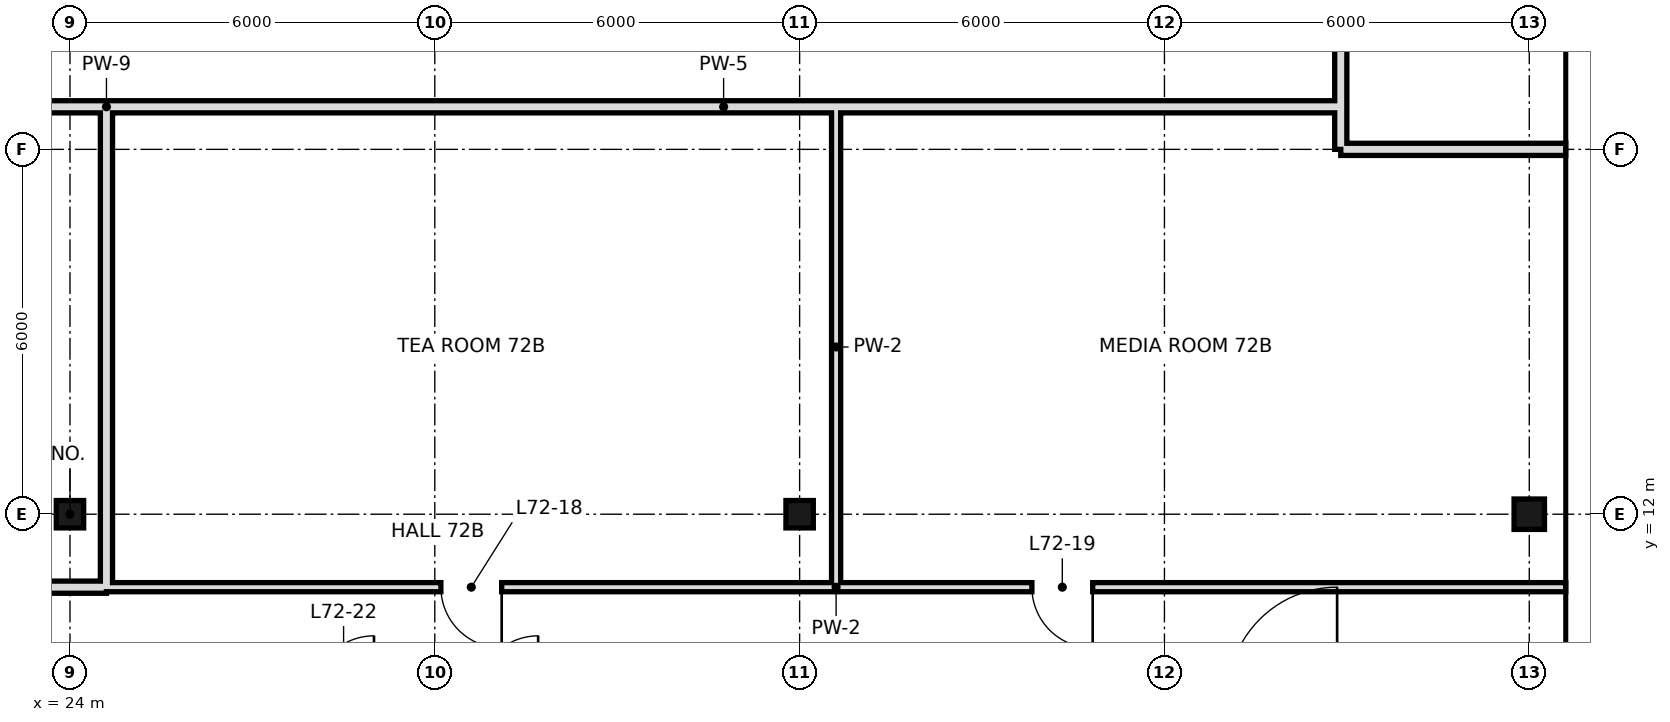
"""IFC4 building model, lengths in metres.
Left out: names, types, materials, properties, quantities, classifications, styles, units other than length and angle.
Written with IfcOpenShell. Run it as: python <this file> out.ifc"""

import sys

from ifc_helpers import new_model, si_unit, direction, frame, frame_2d, origin, origin_2d, place, context, subcontext, project, spatial, rectangle, hollow_rectangle, extrude, element, fill, save


model = new_model("IFC4")
c1 = context("Model", 3, precision=1e-05, world=origin(), true_north=direction((0.0, 1.0)))
c2 = subcontext(c1, "Body", "Model", "MODEL_VIEW")
j1 = project(units=[si_unit("LENGTHUNIT", "METRE"), si_unit("PLANEANGLEUNIT", "RADIAN")], contexts=[c1])
p1 = place(None, origin())
s1 = spatial("IfcSite", under=j1, at=p1, CompositionType="ELEMENT")
p2 = place(p1, origin())
s2 = spatial("IfcBuilding", under=s1, at=p2, CompositionType="ELEMENT")
p3 = place(p2, frame((0.0, 0.0, 305.2)))
s3 = spatial("IfcBuildingStorey", under=s2, at=p3, CompositionType="ELEMENT", Elevation=305.2)
for number, where, z_axis, x_axis in (
    (1, (24.0, 12.0, 0.0), (0.0, 0.0, 1.0), (1.0, 0.0, 0.0)),
    (2, (36.0, 12.0, 0.0), (0.0, 0.0, 1.0), (1.0, 0.0, 0.0)),
):
    element("IfcColumn", number, at=place(p3, frame(where, z_axis=z_axis, x_axis=x_axis)), inside=s3, PredefinedType="COLUMN", context=c2, shape_type="SweptSolid", body=[
        extrude(hollow_rectangle(XDim=0.45, YDim=0.45, WallThickness=0.022, at=origin_2d()), origin(), (0.0, 0.0, 1.0), 3.6),
    ])
p4 = place(p3, frame((48.0, 12.0, 0.0), z_axis=(0.0, 0.0, 1.0), x_axis=(1.0, 0.0, 0.0)))
e3 = element("IfcColumn", 3, at=p4, inside=s3, PredefinedType="COLUMN", context=c2, shape_type="SweptSolid", body=[
    extrude(hollow_rectangle(XDim=0.5, YDim=0.5, WallThickness=0.025, at=origin_2d()), origin(), (0.0, 0.0, 1.0), 3.6),
])
p5 = place(p3, frame((24.6, 10.8, 0.0), z_axis=(0.0, 0.0, 1.0), x_axis=(0.0, 1.0, 0.0)))
e4 = element("IfcWall", 4, at=p5, inside=s3, PredefinedType="SOLIDWALL", context=c2, shape_type="SweptSolid", body=[
    extrude(rectangle(XDim=7.9, YDim=0.2, at=frame_2d((3.95, 0.0))), origin(), (0.0, 0.0, 1.0), 2.72),
])
p6 = place(p3, frame((36.6, 10.8, 0.0), z_axis=(0.0, 0.0, 1.0), x_axis=(0.0, 1.0, 0.0)))
e5 = element("IfcWall", 5, at=p6, inside=s3, PredefinedType="PARTITIONING", context=c2, shape_type="SweptSolid", body=[
    extrude(rectangle(XDim=7.9, YDim=0.15, at=frame_2d((3.95, 0.0))), origin(), (0.0, 0.0, 1.0), 3.42),
])
p7 = place(p3, frame((44.9, 18.0, 0.0), z_axis=(0.0, 0.0, 1.0), x_axis=(0.0, 1.0, 0.0)))
e6 = element("IfcWall", 6, at=p7, inside=s3, PredefinedType="SOLIDWALL", context=c2, shape_type="SweptSolid", body=[
    extrude(rectangle(XDim=27.949, YDim=0.2, at=frame_2d((13.975, 0.0))), origin(), (0.0, 0.0, 1.0), 2.97),
])
p8 = place(p7, frame((8.36, 0.0, 0.0)))
e7 = element("IfcOpeningElement", 7, at=p8, cuts=e6, PredefinedType="OPENING", context=c2, shape_type="SweptSolid", body=[
    extrude(rectangle(XDim=1.2, YDim=2.4, at=frame_2d((0.6, 1.2))), frame((0.0, 0.11, 0.0), z_axis=(0.0, -1.0, 0.0), x_axis=(1.0, 0.0, 0.0)), (0.0, 0.0, 1.0), 0.22),
])
p9 = place(p3, frame((20.4, 10.8, 0.0), z_axis=(0.0, 0.0, 1.0), x_axis=(1.0, 0.0, 0.0)))
e8 = element("IfcWall", 8, at=p9, inside=s3, PredefinedType="SOLIDWALL", context=c2, shape_type="SweptSolid", body=[
    extrude(rectangle(XDim=4.2, YDim=0.2, at=frame_2d((2.1, 0.0))), origin(), (0.0, 0.0, 1.0), 2.72),
])
p10 = place(p9, frame((2.14, 0.0, 0.0)))
e9 = element("IfcOpeningElement", 9, at=p10, cuts=e8, PredefinedType="OPENING", context=c2, shape_type="SweptSolid", body=[
    extrude(rectangle(XDim=1.0, YDim=2.4, at=frame_2d((0.5, 1.2))), frame((0.0, 0.11, 0.0), z_axis=(0.0, -1.0, 0.0), x_axis=(1.0, 0.0, 0.0)), (0.0, 0.0, 1.0), 0.22),
])
p11 = place(p3, frame((24.6, 10.8, 0.0), z_axis=(0.0, 0.0, 1.0), x_axis=(1.0, 0.0, 0.0)))
e10 = element("IfcWall", 10, at=p11, inside=s3, PredefinedType="PARTITIONING", context=c2, shape_type="SweptSolid", body=[
    extrude(rectangle(XDim=24.0, YDim=0.15, at=frame_2d((12.0, 0.0))), origin(), (0.0, 0.0, 1.0), 3.42),
])
p12 = place(p11, frame((5.5, 0.0, 0.0)))
e11 = element("IfcOpeningElement", 11, at=p12, cuts=e10, PredefinedType="OPENING", context=c2, shape_type="SweptSolid", body=[
    extrude(rectangle(XDim=1.0, YDim=2.4, at=frame_2d((0.5, 1.2))), frame((0.0, 0.085, 0.0), z_axis=(0.0, -1.0, 0.0), x_axis=(1.0, 0.0, 0.0)), (0.0, 0.0, 1.0), 0.17),
])
p13 = place(p11, frame((15.22, 0.0, 0.0)))
e12 = element("IfcOpeningElement", 12, at=p13, cuts=e10, PredefinedType="OPENING", context=c2, shape_type="SweptSolid", body=[
    extrude(rectangle(XDim=1.0, YDim=2.4, at=frame_2d((0.5, 1.2))), frame((0.0, 0.085, 0.0), z_axis=(0.0, -1.0, 0.0), x_axis=(1.0, 0.0, 0.0)), (0.0, 0.0, 1.0), 0.17),
])
p14 = place(p3, frame((44.9, 18.0, 0.0), z_axis=(0.0, 0.0, 1.0), x_axis=(1.0, 0.0, 0.0)))
e13 = element("IfcWall", 13, at=p14, inside=s3, PredefinedType="SOLIDWALL", context=c2, shape_type="SweptSolid", body=[
    extrude(rectangle(XDim=3.7, YDim=0.2, at=frame_2d((1.85, 0.0))), origin(), (0.0, 0.0, 1.0), 2.72),
])
p15 = place(p3, frame((24.6, 18.7, 0.0), z_axis=(0.0, 0.0, 1.0), x_axis=(1.0, 0.0, 0.0)))
e14 = element("IfcWall", 14, at=p15, inside=s3, PredefinedType="SOLIDWALL", context=c2, shape_type="SweptSolid", body=[
    extrude(rectangle(XDim=20.3, YDim=0.2, at=frame_2d((10.15, 0.0))), origin(), (0.0, 0.0, 1.0), 2.72),
])
p16 = place(p3, frame((20.4, 18.7, 0.0), z_axis=(0.0, 0.0, 1.0), x_axis=(1.0, 0.0, 0.0)))
e15 = element("IfcWall", 15, at=p16, inside=s3, PredefinedType="SOLIDWALL", context=c2, shape_type="SweptSolid", body=[
    extrude(rectangle(XDim=4.2, YDim=0.2, at=frame_2d((2.1, 0.0))), origin(), (0.0, 0.0, 1.0), 3.42),
])
p17 = place(p12, origin())
e16 = element("IfcDoor", 16, at=p17, inside=s3, OperationType="SINGLE_SWING_RIGHT", PredefinedType="DOOR", context=c2, shape_type="SweptSolid", body=[
    extrude(rectangle(XDim=1.0, YDim=2.4, at=frame_2d((0.5, 1.2))), frame((0.0, 0.025, 0.0), z_axis=(0.0, -1.0, 0.0), x_axis=(1.0, 0.0, 0.0)), (0.0, 0.0, 1.0), 0.05),
])
fill(e11, e16)
p18 = place(p13, origin())
e17 = element("IfcDoor", 17, at=p18, inside=s3, OperationType="SINGLE_SWING_RIGHT", PredefinedType="DOOR", context=c2, shape_type="SweptSolid", body=[
    extrude(rectangle(XDim=1.0, YDim=2.4, at=frame_2d((0.5, 1.2))), frame((0.0, 0.025, 0.0), z_axis=(0.0, -1.0, 0.0), x_axis=(1.0, 0.0, 0.0)), (0.0, 0.0, 1.0), 0.05),
])
fill(e12, e17)
save(model, sys.argv[1])
